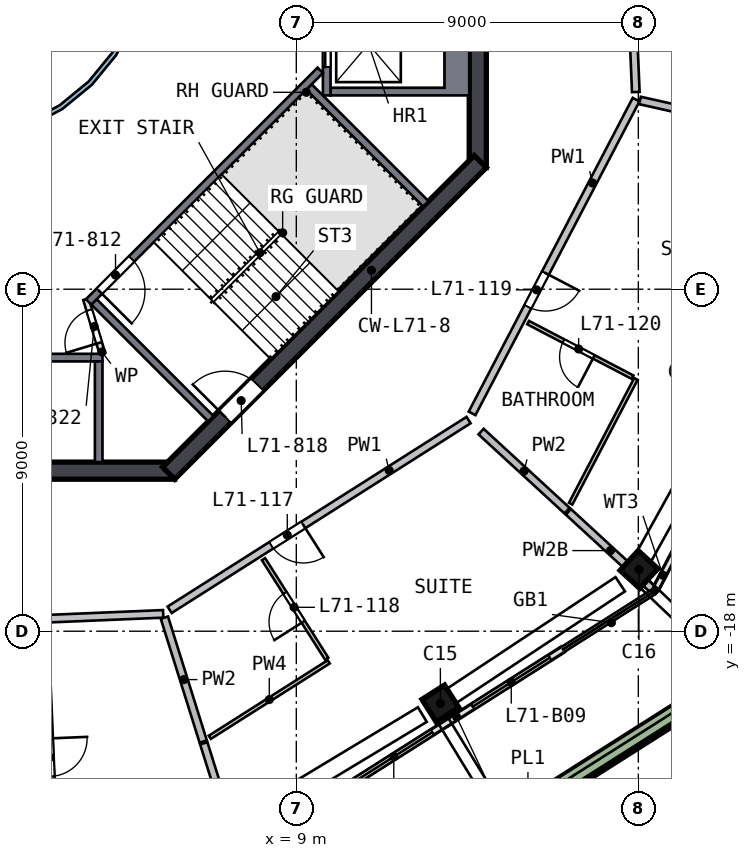
"""IFC4 building model, lengths in metres.
Left out: names, types, materials, properties, quantities, classifications, styles, units other than length and angle.
Written with IfcOpenShell. Run it as: python <this file> out.ifc"""

import sys

from ifc_helpers import new_model, si_unit, direction, frame, frame_2d, origin, origin_2d, place, context, subcontext, project, spatial, polyline, rectangle, outline, extrude, element, fill, save


model = new_model("IFC4")
c1 = context("Model", 3, precision=1e-05, world=origin(), true_north=direction((0.0, 1.0)))
c2 = subcontext(c1, "Body", "Model", "MODEL_VIEW")
j1 = project(units=[si_unit("LENGTHUNIT", "METRE"), si_unit("PLANEANGLEUNIT", "RADIAN")], contexts=[c1])
p1 = place(None, origin())
s1 = spatial("IfcSite", under=j1, at=p1, CompositionType="ELEMENT")
p2 = place(p1, origin())
s2 = spatial("IfcBuilding", under=s1, at=p2, CompositionType="ELEMENT")
p3 = place(p2, frame((0.0, 0.0, 288.0)))
s3 = spatial("IfcBuildingStorey", under=s2, at=p3, CompositionType="ELEMENT", Elevation=288.0)
p4 = place(p3, frame((12.677, -19.975, 0.0), z_axis=(0.094528073, 0.061066808, 0.993647467), x_axis=(0.839178467, 0.532086167, -0.112533601)))
e1 = element("IfcColumn", 1, at=p4, inside=s3, PredefinedType="COLUMN", context=c2, shape_type="SweptSolid", body=[
    extrude(rectangle(XDim=0.7, YDim=0.7, at=origin_2d()), origin(), (0.0, 0.0, 1.0), 3.21),
])
p5 = place(p3, frame((17.923, -16.481, 0.0), z_axis=(0.077616288, 0.085902454, 0.993275632), x_axis=(-0.672140187, -0.731317306, 0.115769454)))
e2 = element("IfcColumn", 2, at=p5, inside=s3, PredefinedType="COLUMN", context=c2, shape_type="SweptSolid", body=[
    extrude(rectangle(XDim=0.7, YDim=0.7, at=origin_2d()), origin(), (0.0, 0.0, 1.0), 3.211),
])
p6 = place(p3, frame((13.775, -5.799, 0.0), z_axis=(0.0, 0.0, 1.0), x_axis=(0.0, 1.0, 0.0)))
e3 = element("IfcWall", 3, at=p6, inside=s3, PredefinedType="SHEAR", context=c2, shape_type="SweptSolid", body=[
    extrude(rectangle(XDim=11.598, YDim=0.45, at=frame_2d((5.799, 0.0))), origin(), (0.0, 0.0, 1.0), 3.5),
])
p7 = place(p6, frame((4.899, 0.0, 0.0)))
e4 = element("IfcOpeningElement", 4, at=p7, cuts=e3, PredefinedType="OPENING", context=c2, shape_type="SweptSolid", body=[
    extrude(rectangle(XDim=1.8, YDim=2.1, at=frame_2d((0.9, 1.05))), frame((0.0, 0.235, 0.0), z_axis=(0.0, -1.0, 0.0), x_axis=(1.0, 0.0, 0.0)), (0.0, 0.0, 1.0), 0.47),
])
p8 = place(p3, frame((-5.799, -13.775, 0.0), z_axis=(0.0, 0.0, 1.0), x_axis=(1.0, 0.0, 0.0)))
e5 = element("IfcWall", 5, at=p8, inside=s3, PredefinedType="SHEAR", context=c2, shape_type="SweptSolid", body=[
    extrude(rectangle(XDim=11.598, YDim=0.45, at=frame_2d((5.799, 0.0))), origin(), (0.0, 0.0, 1.0), 3.5),
])
p9 = place(p3, frame((5.64, -13.841, 0.0), z_axis=(0.0, 0.0, 1.0), x_axis=(0.707106781, 0.707106781, 0.0)))
e6 = element("IfcWall", 6, at=p9, inside=s3, PredefinedType="SHEAR", context=c2, shape_type="SweptSolid", body=[
    extrude(rectangle(XDim=11.598, YDim=0.45, at=frame_2d((5.799, 0.0))), origin(), (0.0, 0.0, 1.0), 3.5),
])
p10 = place(p9, frame((2.099, 0.0, 0.0)))
e7 = element("IfcOpeningElement", 7, at=p10, cuts=e6, PredefinedType="OPENING", context=c2, shape_type="SweptSolid", body=[
    extrude(rectangle(XDim=1.2, YDim=2.1, at=frame_2d((0.6, 1.05))), frame((0.0, 0.235, 0.0), z_axis=(0.0, -1.0, 0.0), x_axis=(1.0, 0.0, 0.0)), (0.0, 0.0, 1.0), 0.47),
])
p11 = place(p3, frame((10.214, -22.16, 0.0), z_axis=(0.0, 0.0, 1.0), x_axis=(0.844310466, 0.535854306, 0.0)))
e8 = element("IfcWall", 8, at=p11, inside=s3, PredefinedType="SOLIDWALL", context=c2, shape_type="SweptSolid", body=[
    extrude(rectangle(XDim=3.25, YDim=0.15, at=frame_2d((1.625, 0.0))), origin(), (0.0, 0.0, 1.0), 2.525),
])
p12 = place(p11, frame((0.4, 0.0, 0.0)))
e9 = element("IfcOpeningElement", 9, at=p12, cuts=e8, PredefinedType="OPENING", context=c2, shape_type="SweptSolid", body=[
    extrude(rectangle(XDim=2.4, YDim=2.4, at=frame_2d((1.2, 1.2))), frame((0.0, 0.085, 0.0), z_axis=(0.0, -1.0, 0.0), x_axis=(1.0, 0.0, 0.0)), (0.0, 0.0, 1.0), 0.17),
])
p13 = place(p3, frame((12.958, -20.419, 0.0), z_axis=(0.0, 0.0, 1.0), x_axis=(0.844320597, 0.535838342, 0.0)))
e10 = element("IfcWall", 10, at=p13, inside=s3, PredefinedType="SOLIDWALL", context=c2, shape_type="SweptSolid", body=[
    extrude(rectangle(XDim=3.611, YDim=0.15, at=frame_2d((1.806, 0.0))), origin(), (0.0, 0.0, 1.0), 2.525),
])
p14 = place(p13, frame((0.811, 0.0, 0.0)))
e11 = element("IfcOpeningElement", 11, at=p14, cuts=e10, PredefinedType="OPENING", context=c2, shape_type="SweptSolid", body=[
    extrude(rectangle(XDim=2.4, YDim=2.4, at=frame_2d((1.2, 1.2))), frame((0.0, 0.085, 0.0), z_axis=(0.0, -1.0, 0.0), x_axis=(1.0, 0.0, 0.0)), (0.0, 0.0, 1.0), 0.17),
])
p15 = place(p3, frame((18.466, -16.875, 0.0), z_axis=(0.0, 0.0, 1.0), x_axis=(0.4633106, 0.886195965, 0.0)))
e12 = element("IfcWall", 12, at=p15, inside=s3, PredefinedType="SOLIDWALL", context=c2, shape_type="SweptSolid", body=[
    extrude(rectangle(XDim=3.787, YDim=0.15, at=frame_2d((1.893, 0.0))), origin(), (0.0, 0.0, 1.0), 2.525),
])
p16 = place(p15, frame((0.987, 0.0, 0.0)))
e13 = element("IfcOpeningElement", 13, at=p16, cuts=e12, PredefinedType="OPENING", context=c2, shape_type="SweptSolid", body=[
    extrude(rectangle(XDim=2.4, YDim=2.4, at=frame_2d((1.2, 1.2))), frame((0.0, 0.085, 0.0), z_axis=(0.0, -1.0, 0.0), x_axis=(1.0, 0.0, 0.0)), (0.0, 0.0, 1.0), 0.17),
])
p17 = place(p3, frame((9.513, -26.188, 0.0), z_axis=(0.0, 0.0, 1.0), x_axis=(0.844331348, 0.535821402, 0.0)))
e14 = element("IfcWall", 14, at=p17, inside=s3, PredefinedType="SOLIDWALL", context=c2, shape_type="SweptSolid", body=[
    extrude(rectangle(XDim=13.224, YDim=0.5, at=frame_2d((6.612, 0.0))), origin(), (0.0, 0.0, 1.0), 0.7),
])
p18 = place(p3, origin())
e15 = element("IfcWall", 15, at=p18, inside=s3, PredefinedType="SOLIDWALL", context=c2, shape_type="SweptSolid", body=[
    extrude(outline(polyline([(13.55, -3.9), (9.9, -3.9), (9.9, -3.7), (12.9, -3.7), (12.9, -1.4), (9.9, -1.4), (9.9, -1.2), (13.55, -1.2), (13.55, -3.9)])), origin(), (0.0, 0.0, 1.0), 3.19),
])
p19 = place(p3, frame((9.8, -1.2, 0.0), z_axis=(0.0, 0.0, 1.0), x_axis=(0.0, -1.0, 0.0)))
e16 = element("IfcWall", 16, at=p19, inside=s3, PredefinedType="SOLIDWALL", context=c2, shape_type="SweptSolid", body=[
    extrude(rectangle(XDim=2.7, YDim=0.2, at=frame_2d((1.35, 0.0))), origin(), (0.0, 0.0, 1.0), 3.19),
])
p20 = place(p19, frame((0.75, 0.0, 0.0)))
e17 = element("IfcOpeningElement", 17, at=p20, cuts=e16, PredefinedType="OPENING", context=c2, shape_type="SweptSolid", body=[
    extrude(rectangle(XDim=1.2, YDim=2.1, at=frame_2d((0.6, 1.05))), frame((0.0, 0.11, 0.0), z_axis=(0.0, -1.0, 0.0), x_axis=(1.0, 0.0, 0.0)), (0.0, 0.0, 1.0), 0.22),
])
p21 = place(p3, frame((-3.9, -10.8, 0.0), z_axis=(0.0, 0.0, 1.0), x_axis=(1.0, 0.0, 0.0)))
e18 = element("IfcWall", 18, at=p21, inside=s3, PredefinedType="SOLIDWALL", context=c2, shape_type="SweptSolid", body=[
    extrude(rectangle(XDim=7.8, YDim=0.2, at=frame_2d((3.9, 0.0))), origin(), (0.0, 0.0, 1.0), 3.19),
])
p22 = place(p21, frame((3.45, 0.0, 0.0)))
e19 = element("IfcOpeningElement", 19, at=p22, cuts=e18, PredefinedType="OPENING", context=c2, shape_type="SweptSolid", body=[
    extrude(rectangle(XDim=0.9, YDim=2.1, at=frame_2d((0.45, 1.05))), frame((0.0, 0.11, 0.0), z_axis=(0.0, -1.0, 0.0), x_axis=(1.0, 0.0, 0.0)), (0.0, 0.0, 1.0), 0.22),
])
p23 = place(p3, frame((3.8, -10.9, 0.0), z_axis=(0.0, 0.0, 1.0), x_axis=(0.0, -1.0, 0.0)))
e20 = element("IfcWall", 20, at=p23, inside=s3, PredefinedType="SOLIDWALL", context=c2, shape_type="SweptSolid", body=[
    extrude(rectangle(XDim=2.65, YDim=0.2, at=frame_2d((1.325, 0.0))), origin(), (0.0, 0.0, 1.0), 3.19),
])
p24 = place(p3, frame((9.629, -3.24, 0.0), z_axis=(0.0, 0.0, 1.0), x_axis=(-0.707120946, -0.707092617, 0.0)))
e21 = element("IfcWall", 21, at=p24, inside=s3, PredefinedType="SOLIDWALL", context=c2, shape_type="SweptSolid", body=[
    extrude(rectangle(XDim=8.618, YDim=0.2, at=frame_2d((4.309, 0.0))), origin(), (0.0, 0.0, 1.0), 3.19),
])
p25 = place(p24, frame((7.018, 0.0, 0.0)))
e22 = element("IfcOpeningElement", 22, at=p25, cuts=e21, PredefinedType="OPENING", context=c2, shape_type="SweptSolid", body=[
    extrude(rectangle(XDim=1.2, YDim=2.1, at=frame_2d((0.6, 1.05))), frame((0.0, 0.11, 0.0), z_axis=(0.0, -1.0, 0.0), x_axis=(1.0, 0.0, 0.0)), (0.0, 0.0, 1.0), 0.22),
])
for number, where, z_axis, x_axis in (
    (23, (3.677, -9.334, 0.0), (0.0, 0.0, 1.0), (0.707, -0.707, 0.0)),
    (24, (9.334, -3.677, 0.0), (0.0, 0.0, 1.0), (0.707, -0.707, 0.0)),
):
    element("IfcWall", number, at=place(p3, frame(where, z_axis=z_axis, x_axis=x_axis)), inside=s3, PredefinedType="SOLIDWALL", context=c2, shape_type="SweptSolid", body=[
        extrude(rectangle(XDim=4.35, YDim=0.2, at=frame_2d((2.175, 0.0))), origin(), (0.0, 0.0, 1.0), 3.19),
    ])
p26 = place(p3, frame((3.9, -10.7, 0.0), z_axis=(0.0, 0.0, 1.0), x_axis=(-0.289808785, 0.957084567, 0.0)))
e25 = element("IfcWall", 25, at=p26, inside=s3, PredefinedType="PARTITIONING", context=c2, shape_type="SweptSolid", body=[
    extrude(rectangle(XDim=1.501, YDim=0.15, at=frame_2d((0.75, 0.0))), origin(), (0.0, 0.0, 1.0), 3.19),
])
p27 = place(p26, frame((0.301, 0.0, 0.0)))
e26 = element("IfcOpeningElement", 26, at=p27, cuts=e25, PredefinedType="OPENING", context=c2, shape_type="SweptSolid", body=[
    extrude(rectangle(XDim=0.9, YDim=2.1, at=frame_2d((0.45, 1.05))), frame((0.0, 0.085, 0.0), z_axis=(0.0, -1.0, 0.0), x_axis=(1.0, 0.0, 0.0)), (0.0, 0.0, 1.0), 0.17),
])
p28 = place(p3, origin())
e27 = element("IfcWall", 27, at=p28, inside=s3, PredefinedType="SOLIDWALL", context=c2, shape_type="SweptSolid", body=[
    extrude(outline(polyline([(5.021, -0.999), (4.73, -1.959), (4.257, -2.844), (3.62, -3.62), (2.844, -4.257), (1.959, -4.73), (0.999, -5.021), (0.0, -5.12), (-0.999, -5.021), (-1.959, -4.73), (-2.844, -4.257), (-3.62, -3.62), (-4.257, -2.844), (-4.73, -1.959), (-5.021, -0.999), (-5.12, 0.0), (-5.021, 0.999), (-4.73, 1.959), (-4.257, 2.844), (-3.62, 3.62), (-2.844, 4.257), (-1.959, 4.73), (-0.999, 5.021), (0.0, 5.12), (0.999, 5.021), (1.959, 4.73), (2.844, 4.257), (3.62, 3.62), (4.257, 2.844), (4.73, 1.959), (5.021, 0.999), (5.12, 0.0), (5.021, -0.999)]), holes=[polyline([(4.904, 0.976), (4.619, 1.913), (4.157, 2.778), (3.535, 3.535), (2.778, 4.157), (1.913, 4.619), (0.976, 4.904), (0.0, 5.0), (-0.976, 4.904), (-1.913, 4.619), (-2.778, 4.157), (-3.535, 3.535), (-4.157, 2.778), (-4.619, 1.913), (-4.904, 0.976), (-5.0, 0.0), (-4.904, -0.976), (-4.619, -1.913), (-4.157, -2.778), (-3.535, -3.535), (-2.778, -4.157), (-1.913, -4.619), (-0.976, -4.904), (0.0, -5.0), (0.976, -4.904), (1.913, -4.619), (2.778, -4.157), (3.535, -3.535), (4.157, -2.778), (4.619, -1.913), (4.904, -0.976), (5.0, 0.0), (4.904, 0.976)])]), origin(), (0.0, 0.0, 1.0), 3.19),
])
p29 = place(p3, frame((5.498, -17.543, 0.0), z_axis=(0.0, 0.0, 1.0), x_axis=(-0.999123175, -0.041867432, 0.0)))
e28 = element("IfcWall", 28, at=p29, inside=s3, PredefinedType="SOLIDWALL", context=c2, shape_type="SweptSolid", body=[
    extrude(rectangle(XDim=9.517, YDim=0.2, at=frame_2d((4.758, 0.0))), origin(), (0.0, 0.0, 1.0), 3.19),
])
p30 = place(p29, frame((3.837, 0.0, 0.0)))
e29 = element("IfcOpeningElement", 29, at=p30, cuts=e28, PredefinedType="OPENING", context=c2, shape_type="SweptSolid", body=[
    extrude(rectangle(XDim=1.8, YDim=2.1, at=frame_2d((0.9, 1.05))), frame((0.0, 0.11, 0.0), z_axis=(0.0, -1.0, 0.0), x_axis=(1.0, 0.0, 0.0)), (0.0, 0.0, 1.0), 0.22),
])
p31 = place(p3, frame((13.533, -12.444, 0.0), z_axis=(0.0, 0.0, 1.0), x_axis=(-0.844321212, -0.535837373, 0.0)))
e30 = element("IfcWall", 30, at=p31, inside=s3, PredefinedType="SOLIDWALL", context=c2, shape_type="SweptSolid", body=[
    extrude(rectangle(XDim=9.317, YDim=0.2, at=frame_2d((4.658, 0.0))), origin(), (0.0, 0.0, 1.0), 3.19),
])
p32 = place(p31, frame((5.15, 0.0, 0.0)))
e31 = element("IfcOpeningElement", 31, at=p32, cuts=e30, PredefinedType="OPENING", context=c2, shape_type="SweptSolid", body=[
    extrude(rectangle(XDim=1.0, YDim=2.1, at=frame_2d((0.5, 1.05))), frame((0.0, 0.11, 0.0), z_axis=(0.0, -1.0, 0.0), x_axis=(1.0, 0.0, 0.0)), (0.0, 0.0, 1.0), 0.22),
])
p33 = place(p3, frame((17.942, -4.01, 0.0), z_axis=(0.0, 0.0, 1.0), x_axis=(-0.46328321, -0.886210284, 0.0)))
e32 = element("IfcWall", 32, at=p33, inside=s3, PredefinedType="SOLIDWALL", context=c2, shape_type="SweptSolid", body=[
    extrude(rectangle(XDim=9.316, YDim=0.2, at=frame_2d((4.658, 0.0))), origin(), (0.0, 0.0, 1.0), 3.19),
])
p34 = place(p33, frame((5.15, 0.0, 0.0)))
e33 = element("IfcOpeningElement", 33, at=p34, cuts=e32, PredefinedType="OPENING", context=c2, shape_type="SweptSolid", body=[
    extrude(rectangle(XDim=1.0, YDim=2.1, at=frame_2d((0.5, 1.05))), frame((0.0, 0.11, 0.0), z_axis=(0.0, -1.0, 0.0), x_axis=(1.0, 0.0, 0.0)), (0.0, 0.0, 1.0), 0.22),
])
p35 = place(p3, frame((17.543, 5.498, 0.0), z_axis=(0.0, 0.0, 1.0), x_axis=(0.041874694, -0.99912287, 0.0)))
e34 = element("IfcWall", 34, at=p35, inside=s3, PredefinedType="SOLIDWALL", context=c2, shape_type="SweptSolid", body=[
    extrude(rectangle(XDim=9.317, YDim=0.2, at=frame_2d((4.658, 0.0))), origin(), (0.0, 0.0, 1.0), 3.19),
])
p36 = place(p35, frame((1.9, 0.0, 0.0)))
e35 = element("IfcOpeningElement", 35, at=p36, cuts=e34, PredefinedType="OPENING", context=c2, shape_type="SweptSolid", body=[
    extrude(rectangle(XDim=1.0, YDim=2.1, at=frame_2d((0.5, 1.05))), frame((0.0, 0.11, 0.0), z_axis=(0.0, -1.0, 0.0), x_axis=(1.0, 0.0, 0.0)), (0.0, 0.0, 1.0), 0.22),
])
p37 = place(p3, frame((2.372, -17.875, 0.0), z_axis=(0.0, 0.0, 1.0), x_axis=(0.041875994, -0.999122816, 0.0)))
e36 = element("IfcWall", 36, at=p37, inside=s3, PredefinedType="SOLIDWALL", context=c2, shape_type="SweptSolid", body=[
    extrude(rectangle(XDim=10.302, YDim=0.2, at=frame_2d((5.151, 0.0))), origin(), (0.0, 0.0, 1.0), 3.19),
])
p38 = place(p37, frame((2.95, 0.0, 0.0)))
e37 = element("IfcOpeningElement", 37, at=p38, cuts=e36, PredefinedType="OPENING", context=c2, shape_type="SweptSolid", body=[
    extrude(rectangle(XDim=1.0, YDim=2.1, at=frame_2d((0.5, 1.05))), frame((0.0, 0.11, 0.0), z_axis=(0.0, -1.0, 0.0), x_axis=(1.0, 0.0, 0.0)), (0.0, 0.0, 1.0), 0.22),
])
p39 = place(p3, frame((5.529, -17.642, 0.0), z_axis=(0.0, 0.0, 1.0), x_axis=(0.299035356, -0.954242032, 0.0)))
e38 = element("IfcWall", 38, at=p39, inside=s3, PredefinedType="SOLIDWALL", context=c2, shape_type="SweptSolid", body=[
    extrude(rectangle(XDim=3.418, YDim=0.2, at=frame_2d((1.709, 0.0))), origin(), (0.0, 0.0, 1.0), 3.19),
])
p40 = place(p3, frame((6.565, -20.948, 0.0), z_axis=(0.0, 0.0, 1.0), x_axis=(0.29905498, -0.954235882, 0.0)))
e39 = element("IfcWall", 39, at=p40, inside=s3, PredefinedType="SOLIDWALL", context=c2, shape_type="SweptSolid", body=[
    extrude(rectangle(XDim=3.012, YDim=0.2, at=frame_2d((1.506, 0.0))), origin(), (0.0, 0.0, 1.0), 2.69),
])
p41 = place(p3, frame((13.862, -12.747, 0.0), z_axis=(0.0, 0.0, 1.0), x_axis=(0.736105078, -0.67686728, 0.0)))
e40 = element("IfcWall", 40, at=p41, inside=s3, PredefinedType="SOLIDWALL", context=c2, shape_type="SweptSolid", body=[
    extrude(rectangle(XDim=3.074, YDim=0.2, at=frame_2d((1.537, 0.0))), origin(), (0.0, 0.0, 1.0), 3.19),
])
p42 = place(p3, frame((16.159, -14.859, 0.0), z_axis=(0.0, 0.0, 1.0), x_axis=(0.736116799, -0.676854533, 0.0)))
e41 = element("IfcWall", 41, at=p42, inside=s3, PredefinedType="SOLIDWALL", context=c2, shape_type="SweptSolid", body=[
    extrude(rectangle(XDim=3.011, YDim=0.2, at=frame_2d((1.506, 0.0))), origin(), (0.0, 0.0, 1.0), 2.69),
])
p43 = place(p3, frame((18.043, -4.033, 0.0), z_axis=(0.0, 0.0, 1.0), x_axis=(0.975920804, -0.218125156, 0.0)))
e42 = element("IfcWall", 42, at=p43, inside=s3, PredefinedType="SOLIDWALL", context=c2, shape_type="SweptSolid", body=[
    extrude(rectangle(XDim=3.418, YDim=0.2, at=frame_2d((1.709, 0.0))), origin(), (0.0, 0.0, 1.0), 3.19),
])
p44 = place(p3, frame((9.853, -18.807, 0.0), z_axis=(0.0, 0.0, 1.0), x_axis=(-0.844312217, -0.535851547, 0.0)))
e43 = element("IfcWall", 43, at=p44, inside=s3, PredefinedType="PARTITIONING", context=c2, shape_type="SweptSolid", body=[
    extrude(rectangle(XDim=3.704, YDim=0.1, at=frame_2d((1.852, 0.0))), origin(), (0.0, 0.0, 1.0), 3.19),
])
p45 = place(p3, frame((9.799, -18.722, 0.0), z_axis=(0.0, 0.0, 1.0), x_axis=(-0.535840635, 0.844319142, 0.0)))
e44 = element("IfcWall", 44, at=p45, inside=s3, PredefinedType="PARTITIONING", context=c2, shape_type="SweptSolid", body=[
    extrude(rectangle(XDim=3.1, YDim=0.1, at=frame_2d((1.55, 0.0))), origin(), (0.0, 0.0, 1.0), 3.19),
])
p46 = place(p45, frame((1.15, 0.0, 0.0)))
e45 = element("IfcOpeningElement", 45, at=p46, cuts=e44, PredefinedType="OPENING", context=c2, shape_type="SweptSolid", body=[
    extrude(rectangle(XDim=0.9, YDim=2.1, at=frame_2d((0.45, 1.05))), frame((0.0, 0.06, 0.0), z_axis=(0.0, -1.0, 0.0), x_axis=(1.0, 0.0, 0.0)), (0.0, 0.0, 1.0), 0.12),
])
p47 = place(p3, frame((17.847, -11.314, 0.0), z_axis=(0.0, 0.0, 1.0), x_axis=(-0.886233527, 0.463238746, 0.0)))
e46 = element("IfcWall", 46, at=p47, inside=s3, PredefinedType="PARTITIONING", context=c2, shape_type="SweptSolid", body=[
    extrude(rectangle(XDim=3.1, YDim=0.1, at=frame_2d((1.55, 0.0))), origin(), (0.0, 0.0, 1.0), 3.19),
])
p48 = place(p47, frame((1.15, 0.0, 0.0)))
e47 = element("IfcOpeningElement", 47, at=p48, cuts=e46, PredefinedType="OPENING", context=c2, shape_type="SweptSolid", body=[
    extrude(rectangle(XDim=0.9, YDim=2.1, at=frame_2d((0.45, 1.05))), frame((0.0, 0.06, 0.0), z_axis=(0.0, -1.0, 0.0), x_axis=(1.0, 0.0, 0.0)), (0.0, 0.0, 1.0), 0.12),
])
p49 = place(p3, frame((17.936, -11.361, 0.0), z_axis=(0.0, 0.0, 1.0), x_axis=(-0.463302447, -0.886200227, 0.0)))
e48 = element("IfcWall", 48, at=p49, inside=s3, PredefinedType="PARTITIONING", context=c2, shape_type="SweptSolid", body=[
    extrude(rectangle(XDim=3.704, YDim=0.1, at=frame_2d((1.852, 0.0))), origin(), (0.0, 0.0, 1.0), 3.19),
])
p50 = place(p12, origin())
e49 = element("IfcDoor", 49, at=p50, inside=s3, OperationType="SLIDING_TO_RIGHT", PredefinedType="DOOR", context=c2, shape_type="SweptSolid", body=[
    extrude(rectangle(XDim=2.4, YDim=2.4, at=frame_2d((1.2, 1.2))), frame((0.0, 0.025, 0.0), z_axis=(0.0, -1.0, 0.0), x_axis=(1.0, 0.0, 0.0)), (0.0, 0.0, 1.0), 0.05),
])
fill(e9, e49)
p51 = place(p14, origin())
e50 = element("IfcDoor", 50, at=p51, inside=s3, OperationType="SLIDING_TO_LEFT", PredefinedType="DOOR", context=c2, shape_type="SweptSolid", body=[
    extrude(rectangle(XDim=2.4, YDim=2.4, at=frame_2d((1.2, 1.2))), frame((0.0, 0.025, 0.0), z_axis=(0.0, -1.0, 0.0), x_axis=(1.0, 0.0, 0.0)), (0.0, 0.0, 1.0), 0.05),
])
fill(e11, e50)
p52 = place(p20, origin())
e51 = element("IfcDoor", 51, at=p52, inside=s3, OperationType="DOUBLE_DOOR_SLIDING", PredefinedType="DOOR", context=c2, shape_type="SweptSolid", body=[
    extrude(rectangle(XDim=1.2, YDim=2.1, at=frame_2d((0.6, 1.05))), frame((0.0, 0.025, 0.0), z_axis=(0.0, -1.0, 0.0), x_axis=(1.0, 0.0, 0.0)), (0.0, 0.0, 1.0), 0.05),
])
fill(e17, e51)
p53 = place(p25, origin())
e52 = element("IfcDoor", 52, at=p53, inside=s3, OperationType="SINGLE_SWING_RIGHT", PredefinedType="DOOR", context=c2, shape_type="SweptSolid", body=[
    extrude(rectangle(XDim=1.2, YDim=2.1, at=frame_2d((0.6, 1.05))), frame((0.0, 0.025, 0.0), z_axis=(0.0, -1.0, 0.0), x_axis=(1.0, 0.0, 0.0)), (0.0, 0.0, 1.0), 0.05),
])
fill(e22, e52)
p54 = place(p10, origin())
e53 = element("IfcDoor", 53, at=p54, inside=s3, OperationType="SINGLE_SWING_LEFT", PredefinedType="DOOR", context=c2, shape_type="SweptSolid", body=[
    extrude(rectangle(XDim=1.2, YDim=2.1, at=frame_2d((0.6, 1.05))), frame((0.0, 0.025, 0.0), z_axis=(0.0, -1.0, 0.0), x_axis=(1.0, 0.0, 0.0)), (0.0, 0.0, 1.0), 0.05),
])
fill(e7, e53)
p55 = place(p27, origin())
e54 = element("IfcDoor", 54, at=p55, inside=s3, OperationType="SINGLE_SWING_LEFT", PredefinedType="DOOR", context=c2, shape_type="SweptSolid", body=[
    extrude(rectangle(XDim=0.9, YDim=2.1, at=frame_2d((0.45, 1.05))), frame((0.0, 0.025, 0.0), z_axis=(0.0, -1.0, 0.0), x_axis=(1.0, 0.0, 0.0)), (0.0, 0.0, 1.0), 0.05),
])
fill(e26, e54)
p56 = place(p32, origin())
e55 = element("IfcDoor", 55, at=p56, inside=s3, OperationType="SINGLE_SWING_LEFT", PredefinedType="DOOR", context=c2, shape_type="SweptSolid", body=[
    extrude(rectangle(XDim=1.0, YDim=2.1, at=frame_2d((0.5, 1.05))), frame((0.0, 0.025, 0.0), z_axis=(0.0, -1.0, 0.0), x_axis=(1.0, 0.0, 0.0)), (0.0, 0.0, 1.0), 0.05),
])
fill(e31, e55)
p57 = place(p46, origin())
e56 = element("IfcDoor", 56, at=p57, inside=s3, OperationType="SINGLE_SWING_LEFT", PredefinedType="DOOR", context=c2, shape_type="SweptSolid", body=[
    extrude(rectangle(XDim=0.9, YDim=2.1, at=frame_2d((0.45, 1.05))), frame((0.0, 0.025, 0.0), z_axis=(0.0, -1.0, 0.0), x_axis=(1.0, 0.0, 0.0)), (0.0, 0.0, 1.0), 0.05),
])
fill(e45, e56)
p58 = place(p34, origin())
e57 = element("IfcDoor", 57, at=p58, inside=s3, OperationType="SINGLE_SWING_LEFT", PredefinedType="DOOR", context=c2, shape_type="SweptSolid", body=[
    extrude(rectangle(XDim=1.0, YDim=2.1, at=frame_2d((0.5, 1.05))), frame((0.0, 0.025, 0.0), z_axis=(0.0, -1.0, 0.0), x_axis=(1.0, 0.0, 0.0)), (0.0, 0.0, 1.0), 0.05),
])
fill(e33, e57)
p59 = place(p48, origin())
e58 = element("IfcDoor", 58, at=p59, inside=s3, OperationType="SINGLE_SWING_LEFT", PredefinedType="DOOR", context=c2, shape_type="SweptSolid", body=[
    extrude(rectangle(XDim=0.9, YDim=2.1, at=frame_2d((0.45, 1.05))), frame((0.0, 0.025, 0.0), z_axis=(0.0, -1.0, 0.0), x_axis=(1.0, 0.0, 0.0)), (0.0, 0.0, 1.0), 0.05),
])
fill(e47, e58)
save(model, sys.argv[1])
